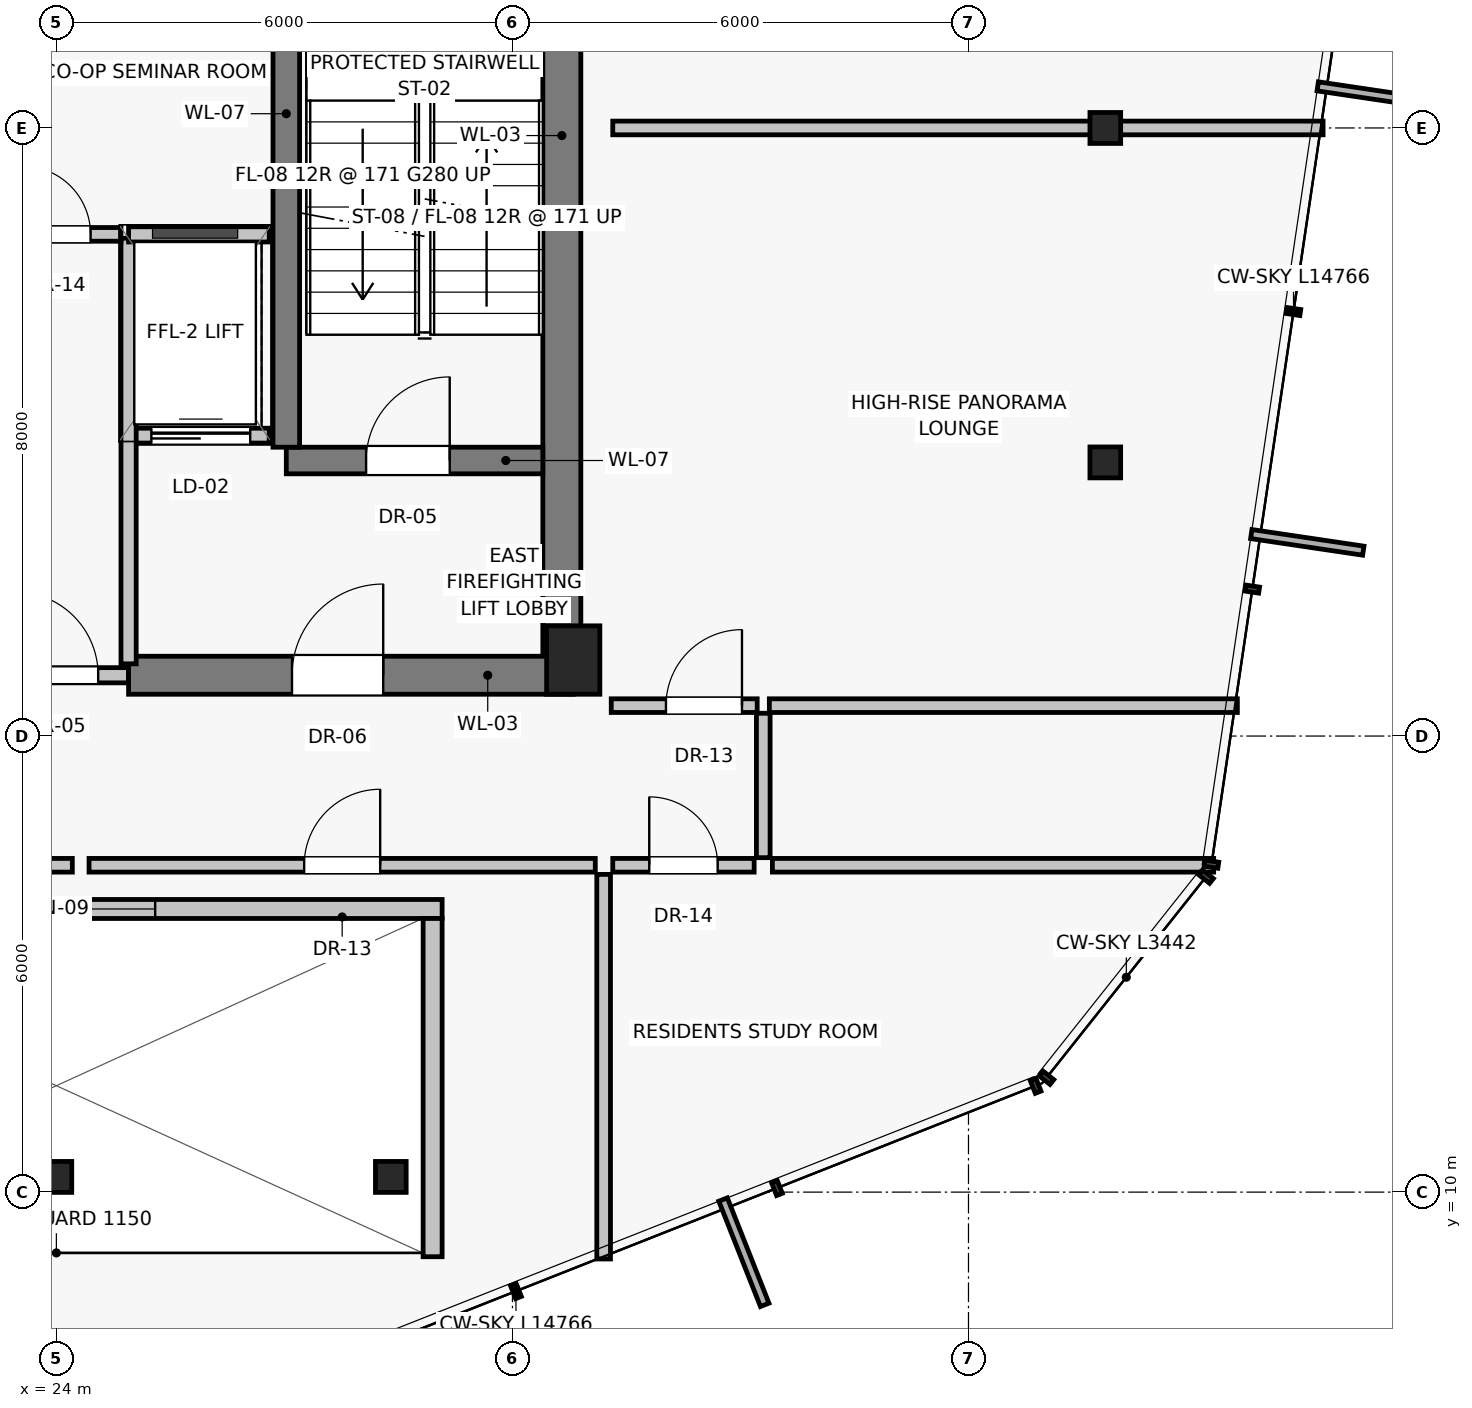
"""IFC4 building model, lengths in metres.
Left out: names, types, materials, properties, quantities, classifications, styles, units other than length and angle.
Written with IfcOpenShell. Run it as: python <this file> out.ifc"""

import sys

from ifc_helpers import new_model, si_unit, direction, frame, frame_2d, origin, origin_2d, place, context, subcontext, project, spatial, rectangle, i_section, extrude, source, transform, mapped, element, fill, save


model = new_model("IFC4")
c1 = context("Model", 3, precision=1e-05, world=origin(), true_north=direction((0.0, 1.0)))
c2 = subcontext(c1, "Body", "Model", "MODEL_VIEW")
j1 = project(units=[si_unit("LENGTHUNIT", "METRE"), si_unit("PLANEANGLEUNIT", "RADIAN")], contexts=[c1])
p1 = place(None, origin())
s1 = spatial("IfcSite", under=j1, at=p1, CompositionType="ELEMENT")
p2 = place(p1, origin())
s2 = spatial("IfcBuilding", under=s1, at=p2, CompositionType="ELEMENT")
p3 = place(p2, frame((0.0, 0.0, 236.55)))
s3 = spatial("IfcBuildingStorey", under=s2, at=p3, CompositionType="ELEMENT", Elevation=236.55)
p4 = place(p3, frame((30.8, 17.0, 0.0), z_axis=(0.0, 0.0, 1.0), x_axis=(1.0, 0.0, 0.0)))
e1 = element("IfcColumn", 1, at=p4, inside=s3, PredefinedType="PILASTER", context=c2, shape_type="SweptSolid", body=[
    extrude(rectangle(XDim=0.7, YDim=0.9, at=origin_2d()), origin(), (0.0, 0.0, 1.0), 4.1),
])
for number, where, z_axis, x_axis in (
    (2, (37.8, 19.6, 0.0), (0.0, 0.0, 1.0), (1.0, 0.0, 0.0)),
    (3, (37.8, 24.0, 0.0), (0.0, 0.0, 1.0), (1.0, 0.0, 0.0)),
    (4, (24.0, 10.2, 0.0), (0.0, 0.0, 1.0), (1.0, 0.0, 0.0)),
    (5, (28.4, 10.2, 0.0), (0.0, 0.0, 1.0), (1.0, 0.0, 0.0)),
):
    element("IfcColumn", number, at=place(p3, frame(where, z_axis=z_axis, x_axis=x_axis)), inside=s3, PredefinedType="COLUMN", context=c2, shape_type="SweptSolid", body=[
        extrude(i_section(OverallWidth=0.404, OverallDepth=0.407, WebThickness=0.025, FlangeThickness=0.04, at=origin_2d()), origin(), (0.0, 0.0, 1.0), 4.1),
    ])
p5 = place(p3, frame((18.925, 13.725, 0.0), z_axis=(0.0, 0.0, 1.0), x_axis=(1.0, 0.0, 0.0)))
e6 = element("IfcWall", 6, at=p5, inside=s3, PredefinedType="SOLIDWALL", context=c2, shape_type="SweptSolid", body=[
    extrude(rectangle(XDim=10.15, YDim=0.25, at=frame_2d((5.075, 0.0))), origin(), (0.0, 0.0, 1.0), 3.512),
])
p6 = place(p5, frame((3.775, 0.0, 0.7)))
e7 = element("IfcOpeningElement", 7, at=p6, cuts=e6, PredefinedType="OPENING", context=c2, shape_type="SweptSolid", body=[
    extrude(rectangle(XDim=2.6, YDim=2.1, at=frame_2d((1.3, 1.05))), frame((0.0, 0.135, 0.0), z_axis=(0.0, -1.0, 0.0), x_axis=(1.0, 0.0, 0.0)), (0.0, 0.0, 1.0), 0.27),
])
p7 = place(p3, frame((28.95, 13.6, 0.0), z_axis=(0.0, 0.0, 1.0), x_axis=(0.0, -1.0, 0.0)))
e8 = element("IfcWall", 8, at=p7, inside=s3, PredefinedType="SOLIDWALL", context=c2, shape_type="SweptSolid", body=[
    extrude(rectangle(XDim=4.45, YDim=0.25, at=frame_2d((2.225, 0.0))), origin(), (0.0, 0.0, 1.0), 3.865),
])
p8 = place(p3, frame((30.65, 16.8, 0.0), z_axis=(0.0, 0.0, 1.0), x_axis=(0.0, 1.0, 0.0)))
e9 = element("IfcWall", 9, at=p8, inside=s3, PredefinedType="SHEAR", context=c2, shape_type="SweptSolid", body=[
    extrude(rectangle(XDim=14.2, YDim=0.5, at=frame_2d((7.1, 0.0))), origin(), (0.0, 0.0, 1.0), 3.865),
])
p9 = place(p3, frame((23.05, 16.8, 0.0), z_axis=(0.0, 0.0, 1.0), x_axis=(1.0, 0.0, 0.0)))
e10 = element("IfcWall", 10, at=p9, inside=s3, PredefinedType="SOLIDWALL", context=c2, shape_type="SweptSolid", body=[
    extrude(rectangle(XDim=1.9, YDim=0.2, at=frame_2d((0.95, 0.0))), origin(), (0.0, 0.0, 1.0), 3.015),
])
p10 = place(p9, frame((0.4, 0.0, 0.0)))
e11 = element("IfcOpeningElement", 11, at=p10, cuts=e10, PredefinedType="OPENING", context=c2, shape_type="SweptSolid", body=[
    extrude(rectangle(XDim=1.1, YDim=2.03, at=frame_2d((0.55, 1.015))), frame((0.0, 0.11, 0.0), z_axis=(0.0, -1.0, 0.0), x_axis=(1.0, 0.0, 0.0)), (0.0, 0.0, 1.0), 0.22),
])
p11 = place(p3, frame((24.95, 16.8, 0.0), z_axis=(0.0, 0.0, 1.0), x_axis=(1.0, 0.0, 0.0)))
e12 = element("IfcWall", 12, at=p11, inside=s3, PredefinedType="SHEAR", context=c2, shape_type="SweptSolid", body=[
    extrude(rectangle(XDim=5.85, YDim=0.5, at=frame_2d((2.925, 0.0))), origin(), (0.0, 0.0, 1.0), 3.865),
])
p12 = place(p11, frame((2.15, 0.0, 0.0)))
e13 = element("IfcOpeningElement", 13, at=p12, cuts=e12, PredefinedType="OPENING", context=c2, shape_type="SweptSolid", body=[
    extrude(rectangle(XDim=1.2, YDim=2.03, at=frame_2d((0.6, 1.015))), frame((0.0, 0.26, 0.0), z_axis=(0.0, -1.0, 0.0), x_axis=(1.0, 0.0, 0.0)), (0.0, 0.0, 1.0), 0.52),
])
p13 = place(p3, frame((24.95, 19.95, 0.0), z_axis=(0.0, 0.0, 1.0), x_axis=(1.0, 0.0, 0.0)))
e14 = element("IfcWall", 14, at=p13, inside=s3, PredefinedType="SOLIDWALL", context=c2, shape_type="SweptSolid", body=[
    extrude(rectangle(XDim=1.85, YDim=0.2, at=frame_2d((0.925, 0.0))), origin(), (0.0, 0.0, 1.0), 3.865),
])
p14 = place(p13, frame((0.3, 0.0, 0.0)))
e15 = element("IfcOpeningElement", 15, at=p14, cuts=e14, PredefinedType="OPENING", context=c2, shape_type="SweptSolid", body=[
    extrude(rectangle(XDim=1.3, YDim=2.25, at=frame_2d((0.65, 1.125))), frame((0.0, 0.11, 0.0), z_axis=(0.0, -1.0, 0.0), x_axis=(1.0, 0.0, 0.0)), (0.0, 0.0, 1.0), 0.22),
])
p15 = place(p3, frame((27.025, 19.625, 0.0), z_axis=(0.0, 0.0, 1.0), x_axis=(1.0, 0.0, 0.0)))
e16 = element("IfcWall", 16, at=p15, inside=s3, PredefinedType="SHEAR", context=c2, shape_type="SweptSolid", body=[
    extrude(rectangle(XDim=3.375, YDim=0.35, at=frame_2d((1.688, 0.0))), origin(), (0.0, 0.0, 1.0), 3.865),
])
p16 = place(p15, frame((1.05, 0.0, 0.0)))
e17 = element("IfcOpeningElement", 17, at=p16, cuts=e16, PredefinedType="OPENING", context=c2, shape_type="SweptSolid", body=[
    extrude(rectangle(XDim=1.1, YDim=2.03, at=frame_2d((0.55, 1.015))), frame((0.0, 0.185, 0.0), z_axis=(0.0, -1.0, 0.0), x_axis=(1.0, 0.0, 0.0)), (0.0, 0.0, 1.0), 0.37),
])
p17 = place(p3, frame((27.025, 19.8, 0.0), z_axis=(0.0, 0.0, 1.0), x_axis=(0.0, 1.0, 0.0)))
e18 = element("IfcWall", 18, at=p17, inside=s3, PredefinedType="SHEAR", context=c2, shape_type="SweptSolid", body=[
    extrude(rectangle(XDim=8.775, YDim=0.35, at=frame_2d((4.387, 0.0))), origin(), (0.0, 0.0, 1.0), 3.865),
])
p18 = place(p3, frame((24.95, 16.95, 0.0), z_axis=(0.0, 0.0, 1.0), x_axis=(0.0, 1.0, 0.0)))
e19 = element("IfcWall", 19, at=p18, inside=s3, PredefinedType="SOLIDWALL", context=c2, shape_type="SweptSolid", body=[
    extrude(rectangle(XDim=5.6, YDim=0.2, at=frame_2d((2.8, 0.0))), origin(), (0.0, 0.0, 1.0), 3.865),
])
p19 = place(p3, frame((24.95, 22.6, 0.0), z_axis=(0.0, 0.0, 1.0), x_axis=(1.0, 0.0, 0.0)))
e20 = element("IfcWall", 20, at=p19, inside=s3, PredefinedType="SOLIDWALL", context=c2, shape_type="SweptSolid", body=[
    extrude(rectangle(XDim=1.85, YDim=0.2, at=frame_2d((0.925, 0.0))), origin(), (0.0, 0.0, 1.0), 3.865),
])
p20 = place(p3, frame((23.15, 22.6, 0.0), z_axis=(0.0, 0.0, 1.0), x_axis=(1.0, 0.0, 0.0)))
e21 = element("IfcWall", 21, at=p20, inside=s3, PredefinedType="PARTITIONING", context=c2, shape_type="SweptSolid", body=[
    extrude(rectangle(XDim=1.7, YDim=0.18, at=frame_2d((0.85, 0.0))), origin(), (0.0, 0.0, 1.0), 3.865),
])
p21 = place(p20, frame((0.4, 0.0, 0.0)))
e22 = element("IfcOpeningElement", 22, at=p21, cuts=e21, PredefinedType="OPENING", context=c2, shape_type="SweptSolid", body=[
    extrude(rectangle(XDim=0.9, YDim=2.01, at=frame_2d((0.45, 1.005))), frame((0.0, 0.1, 0.0), z_axis=(0.0, -1.0, 0.0), x_axis=(1.0, 0.0, 0.0)), (0.0, 0.0, 1.0), 0.2),
])
p22 = place(p3, frame((31.2, 14.18, 0.0), z_axis=(0.0, 0.0, 1.0), x_axis=(0.0, -1.0, 0.0)))
e23 = element("IfcWall", 23, at=p22, inside=s3, PredefinedType="PARTITIONING", context=c2, shape_type="SweptSolid", body=[
    extrude(rectangle(XDim=5.06, YDim=0.18, at=frame_2d((2.53, 0.0))), origin(), (0.0, 0.0, 1.0), 3.865),
])
p23 = place(p3, frame((15.31, 14.3, 0.0), z_axis=(0.0, 0.0, 1.0), x_axis=(1.0, 0.0, 0.0)))
e24 = element("IfcWall", 24, at=p23, inside=s3, PredefinedType="PARTITIONING", context=c2, shape_type="SweptSolid", body=[
    extrude(rectangle(XDim=8.9, YDim=0.18, at=frame_2d((4.45, 0.0))), origin(), (0.0, 0.0, 1.0), 3.865),
])
p24 = place(p23, frame((3.55, 0.0, 0.0)))
e25 = element("IfcOpeningElement", 25, at=p24, cuts=e24, PredefinedType="OPENING", context=c2, shape_type="SweptSolid", body=[
    extrude(rectangle(XDim=1.8, YDim=2.25, at=frame_2d((0.9, 1.125))), frame((0.0, 0.1, 0.0), z_axis=(0.0, -1.0, 0.0), x_axis=(1.0, 0.0, 0.0)), (0.0, 0.0, 1.0), 0.2),
])
p25 = place(p3, frame((24.43, 14.3, 0.0), z_axis=(0.0, 0.0, 1.0), x_axis=(1.0, 0.0, 0.0)))
e26 = element("IfcWall", 26, at=p25, inside=s3, PredefinedType="PARTITIONING", context=c2, shape_type="SweptSolid", body=[
    extrude(rectangle(XDim=6.66, YDim=0.18, at=frame_2d((3.33, 0.0))), origin(), (0.0, 0.0, 1.0), 3.865),
])
p26 = place(p25, frame((2.83, 0.0, 0.0)))
e27 = element("IfcOpeningElement", 27, at=p26, cuts=e26, PredefinedType="OPENING", context=c2, shape_type="SweptSolid", body=[
    extrude(rectangle(XDim=1.0, YDim=2.01, at=frame_2d((0.5, 1.005))), frame((0.0, 0.1, 0.0), z_axis=(0.0, -1.0, 0.0), x_axis=(1.0, 0.0, 0.0)), (0.0, 0.0, 1.0), 0.2),
])
p27 = place(p3, frame((31.32, 24.0, 0.0), z_axis=(0.0, 0.0, 1.0), x_axis=(1.0, 0.0, 0.0)))
e28 = element("IfcWall", 28, at=p27, inside=s3, PredefinedType="PARTITIONING", context=c2, shape_type="SweptSolid", body=[
    extrude(rectangle(XDim=9.345, YDim=0.18, at=frame_2d((4.672, 0.0))), origin(), (0.0, 0.0, 1.0), 3.865),
])
p28 = place(p3, frame((33.3, 14.4, 0.0), z_axis=(0.0, 0.0, 1.0), x_axis=(0.0, 1.0, 0.0)))
e29 = element("IfcWall", 29, at=p28, inside=s3, PredefinedType="PARTITIONING", context=c2, shape_type="SweptSolid", body=[
    extrude(rectangle(XDim=1.9, YDim=0.18, at=frame_2d((0.95, 0.0))), origin(), (0.0, 0.0, 1.0), 3.865),
])
p29 = place(p3, frame((31.3, 16.4, 0.0), z_axis=(0.0, 0.0, 1.0), x_axis=(1.0, 0.0, 0.0)))
e30 = element("IfcWall", 30, at=p29, inside=s3, PredefinedType="PARTITIONING", context=c2, shape_type="SweptSolid", body=[
    extrude(rectangle(XDim=1.92, YDim=0.18, at=frame_2d((0.96, 0.0))), origin(), (0.0, 0.0, 1.0), 3.865),
])
p30 = place(p29, frame((0.72, 0.0, 0.0)))
e31 = element("IfcOpeningElement", 31, at=p30, cuts=e30, PredefinedType="OPENING", context=c2, shape_type="SweptSolid", body=[
    extrude(rectangle(XDim=1.0, YDim=2.01, at=frame_2d((0.5, 1.005))), frame((0.0, 0.1, 0.0), z_axis=(0.0, -1.0, 0.0), x_axis=(1.0, 0.0, 0.0)), (0.0, 0.0, 1.0), 0.2),
])
p31 = place(p3, frame((33.38, 16.4, 0.0), z_axis=(0.0, 0.0, 1.0), x_axis=(1.0, 0.0, 0.0)))
e32 = element("IfcWall", 32, at=p31, inside=s3, PredefinedType="PARTITIONING", context=c2, shape_type="SweptSolid", body=[
    extrude(rectangle(XDim=6.157, YDim=0.18, at=frame_2d((3.079, 0.0))), origin(), (0.0, 0.0, 1.0), 3.865),
])
p32 = place(p3, frame((33.42, 14.3, 0.0), z_axis=(0.0, 0.0, 1.0), x_axis=(1.0, 0.0, 0.0)))
e33 = element("IfcWall", 33, at=p32, inside=s3, PredefinedType="PARTITIONING", context=c2, shape_type="SweptSolid", body=[
    extrude(rectangle(XDim=5.806, YDim=0.18, at=frame_2d((2.903, 0.0))), origin(), (0.0, 0.0, 1.0), 3.865),
])
p33 = place(p3, frame((31.32, 14.3, 0.0), z_axis=(0.0, 0.0, 1.0), x_axis=(1.0, 0.0, 0.0)))
e34 = element("IfcWall", 34, at=p33, inside=s3, PredefinedType="PARTITIONING", context=c2, shape_type="SweptSolid", body=[
    extrude(rectangle(XDim=1.86, YDim=0.18, at=frame_2d((0.93, 0.0))), origin(), (0.0, 0.0, 1.0), 3.865),
])
p34 = place(p33, frame((0.48, 0.0, 0.0)))
e35 = element("IfcOpeningElement", 35, at=p34, cuts=e34, PredefinedType="OPENING", context=c2, shape_type="SweptSolid", body=[
    extrude(rectangle(XDim=0.9, YDim=2.01, at=frame_2d((0.45, 1.005))), frame((0.0, 0.1, 0.0), z_axis=(0.0, -1.0, 0.0), x_axis=(1.0, 0.0, 0.0)), (0.0, 0.0, 1.0), 0.2),
])
m1 = source(origin(), c2, "Body", "SweptSolid", [
    extrude(rectangle(XDim=2.6, YDim=2.1, at=frame_2d((1.3, 1.05))), frame((0.0, 0.03, 0.0), z_axis=(0.0, -1.0, 0.0), x_axis=(1.0, 0.0, 0.0)), (0.0, 0.0, 1.0), 0.06),
])
p35 = place(p6, origin())
e36 = element("IfcWindow", 36, at=p35, inside=s3, PartitioningType="SINGLE_PANEL", PredefinedType="WINDOW", context=c2, shape_type="MappedRepresentation", body=[
    mapped(m1, transform((0.0, 0.0, 0.0), scale=1.0)),
])
fill(e7, e36)
m2 = source(origin(), c2, "Body", "SweptSolid", [
    extrude(rectangle(XDim=1.1, YDim=2.03, at=frame_2d((0.55, 1.015))), frame((0.0, 0.025, 0.0), z_axis=(0.0, -1.0, 0.0), x_axis=(1.0, 0.0, 0.0)), (0.0, 0.0, 1.0), 0.05),
])
p36 = place(p10, origin())
e37 = element("IfcDoor", 37, at=p36, inside=s3, OperationType="SINGLE_SWING_LEFT", PredefinedType="DOOR", context=c2, shape_type="MappedRepresentation", body=[
    mapped(m2, transform((0.0, 0.0, 0.0), scale=1.0)),
])
fill(e11, e37)
m3 = source(origin(), c2, "Body", "SweptSolid", [
    extrude(rectangle(XDim=1.2, YDim=2.03, at=frame_2d((0.6, 1.015))), frame((0.0, 0.025, 0.0), z_axis=(0.0, -1.0, 0.0), x_axis=(1.0, 0.0, 0.0)), (0.0, 0.0, 1.0), 0.05),
])
p37 = place(p12, origin())
e38 = element("IfcDoor", 38, at=p37, inside=s3, OperationType="SINGLE_SWING_RIGHT", PredefinedType="DOOR", context=c2, shape_type="MappedRepresentation", body=[
    mapped(m3, transform((0.0, 0.0, 0.0), scale=1.0)),
])
fill(e13, e38)
m4 = source(origin(), c2, "Body", "SweptSolid", [
    extrude(rectangle(XDim=1.3, YDim=2.25, at=frame_2d((0.65, 1.125))), frame((0.0, 0.025, 0.0), z_axis=(0.0, -1.0, 0.0), x_axis=(1.0, 0.0, 0.0)), (0.0, 0.0, 1.0), 0.05),
])
p38 = place(p14, origin())
e39 = element("IfcDoor", 39, at=p38, inside=s3, OperationType="SLIDING_TO_LEFT", PredefinedType="DOOR", context=c2, shape_type="MappedRepresentation", body=[
    mapped(m4, transform((0.0, 0.0, 0.0), scale=1.0)),
])
fill(e15, e39)
p39 = place(p16, origin())
e40 = element("IfcDoor", 40, at=p39, inside=s3, OperationType="SINGLE_SWING_RIGHT", PredefinedType="DOOR", context=c2, shape_type="MappedRepresentation", body=[
    mapped(m2, transform((0.0, 0.0, 0.0), scale=1.0)),
])
fill(e17, e40)
m5 = source(origin(), c2, "Body", "SweptSolid", [
    extrude(rectangle(XDim=0.9, YDim=2.01, at=frame_2d((0.45, 1.005))), frame((0.0, 0.025, 0.0), z_axis=(0.0, -1.0, 0.0), x_axis=(1.0, 0.0, 0.0)), (0.0, 0.0, 1.0), 0.05),
])
p40 = place(p21, origin())
e41 = element("IfcDoor", 41, at=p40, inside=s3, OperationType="SINGLE_SWING_LEFT", PredefinedType="DOOR", context=c2, shape_type="MappedRepresentation", body=[
    mapped(m5, transform((0.0, 0.0, 0.0), scale=1.0)),
])
fill(e22, e41)
m6 = source(origin(), c2, "Body", "SweptSolid", [
    extrude(rectangle(XDim=1.0, YDim=2.01, at=frame_2d((0.5, 1.005))), frame((0.0, 0.025, 0.0), z_axis=(0.0, -1.0, 0.0), x_axis=(1.0, 0.0, 0.0)), (0.0, 0.0, 1.0), 0.05),
])
p41 = place(p26, origin())
e42 = element("IfcDoor", 42, at=p41, inside=s3, OperationType="SINGLE_SWING_RIGHT", PredefinedType="DOOR", context=c2, shape_type="MappedRepresentation", body=[
    mapped(m6, transform((0.0, 0.0, 0.0), scale=1.0)),
])
fill(e27, e42)
p42 = place(p30, origin())
e43 = element("IfcDoor", 43, at=p42, inside=s3, OperationType="SINGLE_SWING_RIGHT", PredefinedType="DOOR", context=c2, shape_type="MappedRepresentation", body=[
    mapped(m6, transform((0.0, 0.0, 0.0), scale=1.0)),
])
fill(e31, e43)
p43 = place(p34, origin())
e44 = element("IfcDoor", 44, at=p43, inside=s3, OperationType="SINGLE_SWING_LEFT", PredefinedType="DOOR", context=c2, shape_type="MappedRepresentation", body=[
    mapped(m5, transform((0.0, 0.0, 0.0), scale=1.0)),
])
fill(e35, e44)
save(model, sys.argv[1])
